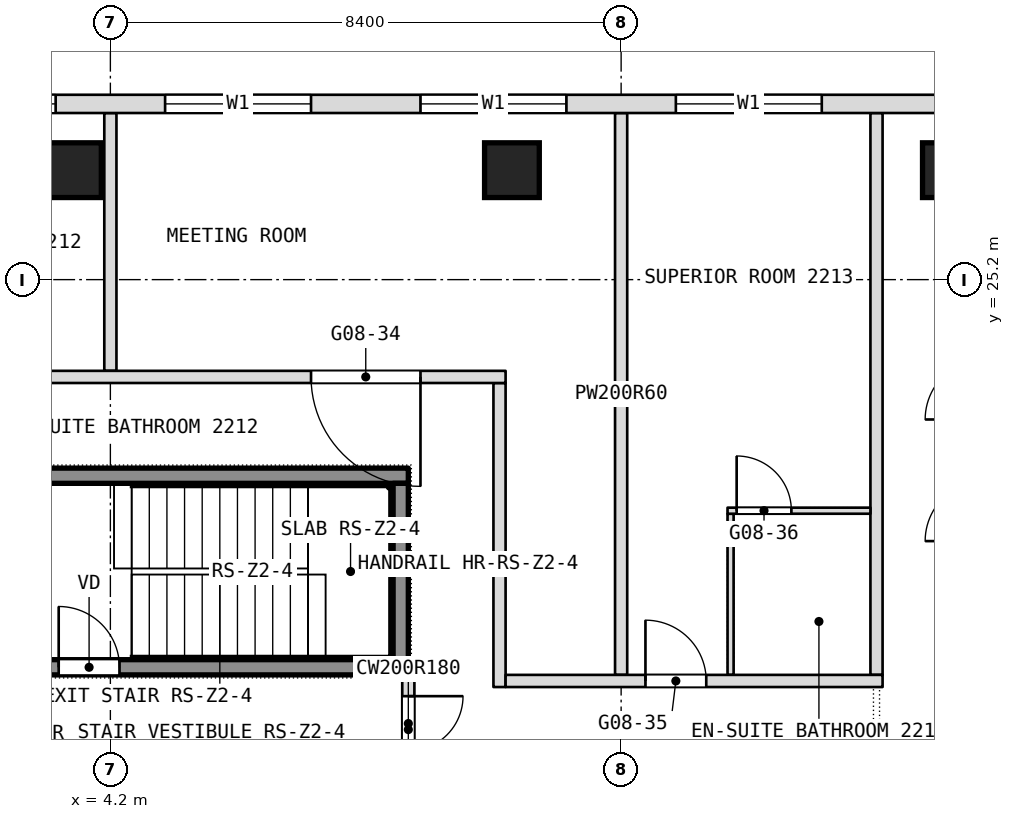
"""IFC4 building model, lengths in metres.
Left out: names, types, materials, properties, quantities, classifications, styles, units other than length and angle.
Written with IfcOpenShell. Run it as: python <this file> out.ifc"""

import sys

from ifc_helpers import new_model, si_unit, direction, frame, frame_2d, origin, origin_2d, place, context, subcontext, project, spatial, rectangle, extrude, element, fill, save


model = new_model("IFC4")
c1 = context("Model", 3, precision=1e-05, world=origin(), true_north=direction((0.0, 1.0)))
c2 = subcontext(c1, "Body", "Model", "MODEL_VIEW")
j1 = project(units=[si_unit("LENGTHUNIT", "METRE"), si_unit("PLANEANGLEUNIT", "RADIAN")], contexts=[c1])
p1 = place(None, origin())
s1 = spatial("IfcSite", under=j1, at=p1, CompositionType="ELEMENT")
p2 = place(p1, origin())
s2 = spatial("IfcBuilding", under=s1, at=p2, CompositionType="ELEMENT")
p3 = place(p2, frame((0.0, 0.0, 104.9)))
s3 = spatial("IfcBuildingStorey", under=s2, at=p3, CompositionType="ELEMENT", Elevation=104.9)
for number, where, z_axis, x_axis in (
    (1, (3.601, 27.0, 0.0), (0.0, 0.0, 1.0), (1.0, 0.0, 0.0)),
    (2, (10.804, 27.0, 0.0), (0.0, 0.0, 1.0), (1.0, 0.0, 0.0)),
    (3, (18.007, 27.0, 0.0), (0.0, 0.0, 1.0), (1.0, 0.0, 0.0)),
):
    element("IfcColumn", number, at=place(p3, frame(where, z_axis=z_axis, x_axis=x_axis)), inside=s3, PredefinedType="COLUMN", context=c2, shape_type="SweptSolid", body=[
        extrude(rectangle(XDim=0.9, YDim=0.9, at=origin_2d()), origin(), (0.0, 0.0, 1.0), 3.6),
    ])
p4 = place(p3, frame((16.8, 18.7, 0.0), z_axis=(0.0, 0.0, 1.0), x_axis=(0.0, 1.0, 0.0)))
e4 = element("IfcWall", 4, at=p4, inside=s3, PredefinedType="PARTITIONING", context=c2, shape_type="SweptSolid", body=[
    extrude(rectangle(XDim=9.24, YDim=0.2, at=frame_2d((4.62, 0.0))), origin(), (0.0, 0.0, 1.0), 3.34),
])
p5 = place(p3, frame((14.4, 18.7, 0.0), z_axis=(0.0, 0.0, 1.0), x_axis=(0.0, 1.0, 0.0)))
e5 = element("IfcWall", 5, at=p5, inside=s3, PredefinedType="PARTITIONING", context=c2, shape_type="SweptSolid", body=[
    extrude(rectangle(XDim=2.65, YDim=0.1, at=frame_2d((1.325, 0.0))), origin(), (0.0, 0.0, 1.0), 3.34),
])
p6 = place(p3, frame((12.6, 18.7, 0.0), z_axis=(0.0, 0.0, 1.0), x_axis=(0.0, 1.0, 0.0)))
e6 = element("IfcWall", 6, at=p6, inside=s3, PredefinedType="PARTITIONING", context=c2, shape_type="SweptSolid", body=[
    extrude(rectangle(XDim=9.24, YDim=0.2, at=frame_2d((4.62, 0.0))), origin(), (0.0, 0.0, 1.0), 3.34),
])
p7 = place(p3, frame((10.6, 18.5, 0.0), z_axis=(0.0, 0.0, 1.0), x_axis=(0.0, 1.0, 0.0)))
e7 = element("IfcWall", 7, at=p7, inside=s3, PredefinedType="PARTITIONING", context=c2, shape_type="SweptSolid", body=[
    extrude(rectangle(XDim=5.0, YDim=0.2, at=frame_2d((2.5, 0.0))), origin(), (0.0, 0.0, 1.0), 3.34),
])
p8 = place(p3, frame((9.1, 16.9, 0.0), z_axis=(0.0, 0.0, 1.0), x_axis=(0.0, 1.0, 0.0)))
e8 = element("IfcWall", 8, at=p8, inside=s3, PredefinedType="PARTITIONING", context=c2, shape_type="SweptSolid", body=[
    extrude(rectangle(XDim=1.8, YDim=0.2, at=frame_2d((0.9, 0.0))), origin(), (0.0, 0.0, 1.0), 3.34),
])
p9 = place(p8, frame((0.55, 0.0, 0.0)))
e9 = element("IfcOpeningElement", 9, at=p9, cuts=e8, PredefinedType="OPENING", context=c2, shape_type="SweptSolid", body=[
    extrude(rectangle(XDim=0.9, YDim=2.1, at=frame_2d((0.45, 1.05))), frame((0.0, 0.1, 0.0), z_axis=(0.0, -1.0, 0.0), x_axis=(1.0, 0.0, 0.0)), (0.0, 0.0, 1.0), 0.2),
])
p10 = place(p3, frame((4.2, 23.7, 0.0), z_axis=(0.0, 0.0, 1.0), x_axis=(0.0, 1.0, 0.0)))
e10 = element("IfcWall", 10, at=p10, inside=s3, PredefinedType="PARTITIONING", context=c2, shape_type="SweptSolid", body=[
    extrude(rectangle(XDim=4.24, YDim=0.2, at=frame_2d((2.12, 0.0))), origin(), (0.0, 0.0, 1.0), 3.34),
])
p11 = place(p3, frame((10.7, 18.6, 0.0), z_axis=(0.0, 0.0, 1.0), x_axis=(1.0, 0.0, 0.0)))
e11 = element("IfcWall", 11, at=p11, inside=s3, PredefinedType="PARTITIONING", context=c2, shape_type="SweptSolid", body=[
    extrude(rectangle(XDim=6.2, YDim=0.2, at=frame_2d((3.1, 0.0))), origin(), (0.0, 0.0, 1.0), 3.34),
])
p12 = place(p11, frame((2.3, 0.0, 0.0)))
e12 = element("IfcOpeningElement", 12, at=p12, cuts=e11, PredefinedType="OPENING", context=c2, shape_type="SweptSolid", body=[
    extrude(rectangle(XDim=1.0, YDim=2.1, at=frame_2d((0.5, 1.05))), frame((0.0, 0.1, 0.0), z_axis=(0.0, -1.0, 0.0), x_axis=(1.0, 0.0, 0.0)), (0.0, 0.0, 1.0), 0.2),
])
p13 = place(p3, frame((14.35, 21.4, 0.0), z_axis=(0.0, 0.0, 1.0), x_axis=(1.0, 0.0, 0.0)))
e13 = element("IfcWall", 13, at=p13, inside=s3, PredefinedType="PARTITIONING", context=c2, shape_type="SweptSolid", body=[
    extrude(rectangle(XDim=2.35, YDim=0.1, at=frame_2d((1.175, 0.0))), origin(), (0.0, 0.0, 1.0), 3.34),
])
p14 = place(p13, frame((0.15, 0.0, 0.0)))
e14 = element("IfcOpeningElement", 14, at=p14, cuts=e13, PredefinedType="OPENING", context=c2, shape_type="SweptSolid", body=[
    extrude(rectangle(XDim=0.9, YDim=2.1, at=frame_2d((0.45, 1.05))), frame((0.0, 0.05, 0.0), z_axis=(0.0, -1.0, 0.0), x_axis=(1.0, 0.0, 0.0)), (0.0, 0.0, 1.0), 0.1),
])
p15 = place(p3, frame((1.5, 23.6, 0.0), z_axis=(0.0, 0.0, 1.0), x_axis=(1.0, 0.0, 0.0)))
e15 = element("IfcWall", 15, at=p15, inside=s3, PredefinedType="PARTITIONING", context=c2, shape_type="SweptSolid", body=[
    extrude(rectangle(XDim=9.2, YDim=0.2, at=frame_2d((4.6, 0.0))), origin(), (0.0, 0.0, 1.0), 3.34),
])
p16 = place(p15, frame((6.0, 0.0, 0.0)))
e16 = element("IfcOpeningElement", 16, at=p16, cuts=e15, PredefinedType="OPENING", context=c2, shape_type="SweptSolid", body=[
    extrude(rectangle(XDim=1.8, YDim=2.1, at=frame_2d((0.9, 1.05))), frame((0.0, 0.1, 0.0), z_axis=(0.0, -1.0, 0.0), x_axis=(1.0, 0.0, 0.0)), (0.0, 0.0, 1.0), 0.2),
])
p17 = place(p3, frame((21.306, 28.09, 0.0), z_axis=(0.0, 0.0, 1.0), x_axis=(-1.0, 0.0, 0.0)))
e17 = element("IfcWall", 17, at=p17, inside=s3, PredefinedType="NOTDEFINED", context=c2, shape_type="SweptSolid", body=[
    extrude(rectangle(XDim=42.612, YDim=0.3, at=frame_2d((21.306, 0.0))), origin(), (0.0, 0.0, 1.0), 3.6),
])
p18 = place(p17, frame((5.406, 0.0, 0.9)))
e18 = element("IfcOpeningElement", 18, at=p18, cuts=e17, PredefinedType="OPENING", context=c2, shape_type="SweptSolid", body=[
    extrude(rectangle(XDim=2.4, YDim=2.1, at=frame_2d((1.2, 1.05))), frame((0.0, 0.15, 0.0), z_axis=(0.0, -1.0, 0.0), x_axis=(1.0, 0.0, 0.0)), (0.0, 0.0, 1.0), 0.3),
])
p19 = place(p17, frame((9.606, 0.0, 0.9)))
e19 = element("IfcOpeningElement", 19, at=p19, cuts=e17, PredefinedType="OPENING", context=c2, shape_type="SweptSolid", body=[
    extrude(rectangle(XDim=2.4, YDim=2.1, at=frame_2d((1.2, 1.05))), frame((0.0, 0.15, 0.0), z_axis=(0.0, -1.0, 0.0), x_axis=(1.0, 0.0, 0.0)), (0.0, 0.0, 1.0), 0.3),
])
p20 = place(p17, frame((13.806, 0.0, 0.9)))
e20 = element("IfcOpeningElement", 20, at=p20, cuts=e17, PredefinedType="OPENING", context=c2, shape_type="SweptSolid", body=[
    extrude(rectangle(XDim=2.4, YDim=2.1, at=frame_2d((1.2, 1.05))), frame((0.0, 0.15, 0.0), z_axis=(0.0, -1.0, 0.0), x_axis=(1.0, 0.0, 0.0)), (0.0, 0.0, 1.0), 0.3),
])
p21 = place(p17, frame((18.006, 0.0, 0.9)))
e21 = element("IfcOpeningElement", 21, at=p21, cuts=e17, PredefinedType="OPENING", context=c2, shape_type="SweptSolid", body=[
    extrude(rectangle(XDim=2.4, YDim=2.1, at=frame_2d((1.2, 1.05))), frame((0.0, 0.15, 0.0), z_axis=(0.0, -1.0, 0.0), x_axis=(1.0, 0.0, 0.0)), (0.0, 0.0, 1.0), 0.3),
])
p22 = place(p17, frame((22.206, 0.0, 0.9)))
e22 = element("IfcOpeningElement", 22, at=p22, cuts=e17, PredefinedType="OPENING", context=c2, shape_type="SweptSolid", body=[
    extrude(rectangle(XDim=2.4, YDim=2.1, at=frame_2d((1.2, 1.05))), frame((0.0, 0.15, 0.0), z_axis=(0.0, -1.0, 0.0), x_axis=(1.0, 0.0, 0.0)), (0.0, 0.0, 1.0), 0.3),
])
p23 = place(p17, frame((26.406, 0.0, 0.9)))
e23 = element("IfcOpeningElement", 23, at=p23, cuts=e17, PredefinedType="OPENING", context=c2, shape_type="SweptSolid", body=[
    extrude(rectangle(XDim=2.4, YDim=2.1, at=frame_2d((1.2, 1.05))), frame((0.0, 0.15, 0.0), z_axis=(0.0, -1.0, 0.0), x_axis=(1.0, 0.0, 0.0)), (0.0, 0.0, 1.0), 0.3),
])
p24 = place(p17, frame((30.606, 0.0, 0.9)))
e24 = element("IfcOpeningElement", 24, at=p24, cuts=e17, PredefinedType="OPENING", context=c2, shape_type="SweptSolid", body=[
    extrude(rectangle(XDim=2.4, YDim=2.1, at=frame_2d((1.2, 1.05))), frame((0.0, 0.15, 0.0), z_axis=(0.0, -1.0, 0.0), x_axis=(1.0, 0.0, 0.0)), (0.0, 0.0, 1.0), 0.3),
])
p25 = place(p17, frame((34.806, 0.0, 0.9)))
e25 = element("IfcOpeningElement", 25, at=p25, cuts=e17, PredefinedType="OPENING", context=c2, shape_type="SweptSolid", body=[
    extrude(rectangle(XDim=2.4, YDim=2.1, at=frame_2d((1.2, 1.05))), frame((0.0, 0.15, 0.0), z_axis=(0.0, -1.0, 0.0), x_axis=(1.0, 0.0, 0.0)), (0.0, 0.0, 1.0), 0.3),
])
p26 = place(p3, frame((2.9, 18.825, 0.1), z_axis=(0.0, 0.0, 1.0), x_axis=(1.0, 0.0, 0.0)))
e26 = element("IfcWall", 26, at=p26, inside=s3, PredefinedType="SHEAR", context=c2, shape_type="SweptSolid", body=[
    extrude(rectangle(XDim=6.2, YDim=0.25, at=frame_2d((3.1, 0.0))), origin(), (0.0, 0.0, 1.0), 3.6),
])
p27 = place(p26, frame((0.45, 0.0, 0.0)))
e27 = element("IfcOpeningElement", 27, at=p27, cuts=e26, PredefinedType="OPENING", context=c2, shape_type="SweptSolid", body=[
    extrude(rectangle(XDim=1.0, YDim=2.1, at=frame_2d((0.5, 1.05))), frame((0.0, 0.125, 0.0), z_axis=(0.0, -1.0, 0.0), x_axis=(1.0, 0.0, 0.0)), (0.0, 0.0, 1.0), 0.25),
])
p28 = place(p3, frame((2.9, 21.975, 0.1), z_axis=(0.0, 0.0, 1.0), x_axis=(1.0, 0.0, 0.0)))
e28 = element("IfcWall", 28, at=p28, inside=s3, PredefinedType="SHEAR", context=c2, shape_type="SweptSolid", body=[
    extrude(rectangle(XDim=6.2, YDim=0.25, at=frame_2d((3.1, 0.0))), origin(), (0.0, 0.0, 1.0), 3.6),
])
p29 = place(p3, frame((8.975, 18.95, 0.1), z_axis=(0.0, 0.0, 1.0), x_axis=(0.0, 1.0, 0.0)))
e29 = element("IfcWall", 29, at=p29, inside=s3, PredefinedType="SHEAR", context=c2, shape_type="SweptSolid", body=[
    extrude(rectangle(XDim=2.9, YDim=0.25, at=frame_2d((1.45, 0.0))), origin(), (0.0, 0.0, 1.0), 3.6),
])
p30 = place(p9, origin())
e30 = element("IfcDoor", 30, at=p30, inside=s3, OperationType="SINGLE_SWING_RIGHT", PredefinedType="DOOR", context=c2, shape_type="SweptSolid", body=[
    extrude(rectangle(XDim=0.9, YDim=2.1, at=frame_2d((0.45, 1.05))), frame((0.0, 0.025, 0.0), z_axis=(0.0, -1.0, 0.0), x_axis=(1.0, 0.0, 0.0)), (0.0, 0.0, 1.0), 0.05),
])
fill(e9, e30)
p31 = place(p12, origin())
e31 = element("IfcDoor", 31, at=p31, inside=s3, OperationType="SINGLE_SWING_RIGHT", PredefinedType="DOOR", context=c2, shape_type="SweptSolid", body=[
    extrude(rectangle(XDim=1.0, YDim=2.1, at=frame_2d((0.5, 1.05))), frame((0.0, 0.025, 0.0), z_axis=(0.0, -1.0, 0.0), x_axis=(1.0, 0.0, 0.0)), (0.0, 0.0, 1.0), 0.05),
])
fill(e12, e31)
p32 = place(p14, origin())
e32 = element("IfcDoor", 32, at=p32, inside=s3, OperationType="SINGLE_SWING_RIGHT", PredefinedType="DOOR", context=c2, shape_type="SweptSolid", body=[
    extrude(rectangle(XDim=0.9, YDim=2.1, at=frame_2d((0.45, 1.05))), frame((0.0, 0.025, 0.0), z_axis=(0.0, -1.0, 0.0), x_axis=(1.0, 0.0, 0.0)), (0.0, 0.0, 1.0), 0.05),
])
fill(e14, e32)
p33 = place(p16, origin())
e33 = element("IfcDoor", 33, at=p33, inside=s3, OperationType="DOUBLE_DOOR_SINGLE_SWING", PredefinedType="DOOR", context=c2, shape_type="SweptSolid", body=[
    extrude(rectangle(XDim=1.8, YDim=2.1, at=frame_2d((0.9, 1.05))), frame((0.0, 0.025, 0.0), z_axis=(0.0, -1.0, 0.0), x_axis=(1.0, 0.0, 0.0)), (0.0, 0.0, 1.0), 0.05),
])
fill(e16, e33)
p34 = place(p18, origin())
e34 = element("IfcWindow", 34, at=p34, inside=s3, PartitioningType="SINGLE_PANEL", PredefinedType="WINDOW", context=c2, shape_type="SweptSolid", body=[
    extrude(rectangle(XDim=2.4, YDim=2.1, at=frame_2d((1.2, 1.05))), frame((0.0, 0.03, 0.0), z_axis=(0.0, -1.0, 0.0), x_axis=(1.0, 0.0, 0.0)), (0.0, 0.0, 1.0), 0.06),
])
fill(e18, e34)
p35 = place(p19, origin())
e35 = element("IfcWindow", 35, at=p35, inside=s3, PartitioningType="SINGLE_PANEL", PredefinedType="WINDOW", context=c2, shape_type="SweptSolid", body=[
    extrude(rectangle(XDim=2.4, YDim=2.1, at=frame_2d((1.2, 1.05))), frame((0.0, 0.03, 0.0), z_axis=(0.0, -1.0, 0.0), x_axis=(1.0, 0.0, 0.0)), (0.0, 0.0, 1.0), 0.06),
])
fill(e19, e35)
p36 = place(p20, origin())
e36 = element("IfcWindow", 36, at=p36, inside=s3, PartitioningType="SINGLE_PANEL", PredefinedType="WINDOW", context=c2, shape_type="SweptSolid", body=[
    extrude(rectangle(XDim=2.4, YDim=2.1, at=frame_2d((1.2, 1.05))), frame((0.0, 0.03, 0.0), z_axis=(0.0, -1.0, 0.0), x_axis=(1.0, 0.0, 0.0)), (0.0, 0.0, 1.0), 0.06),
])
fill(e20, e36)
p37 = place(p21, origin())
e37 = element("IfcWindow", 37, at=p37, inside=s3, PartitioningType="SINGLE_PANEL", PredefinedType="WINDOW", context=c2, shape_type="SweptSolid", body=[
    extrude(rectangle(XDim=2.4, YDim=2.1, at=frame_2d((1.2, 1.05))), frame((0.0, 0.03, 0.0), z_axis=(0.0, -1.0, 0.0), x_axis=(1.0, 0.0, 0.0)), (0.0, 0.0, 1.0), 0.06),
])
fill(e21, e37)
p38 = place(p27, origin())
e38 = element("IfcDoor", 38, at=p38, inside=s3, OperationType="SINGLE_SWING_LEFT", PredefinedType="DOOR", context=c2, shape_type="SweptSolid", body=[
    extrude(rectangle(XDim=1.0, YDim=2.1, at=frame_2d((0.5, 1.05))), frame((0.0, 0.025, 0.0), z_axis=(0.0, -1.0, 0.0), x_axis=(1.0, 0.0, 0.0)), (0.0, 0.0, 1.0), 0.05),
])
fill(e27, e38)
save(model, sys.argv[1])
